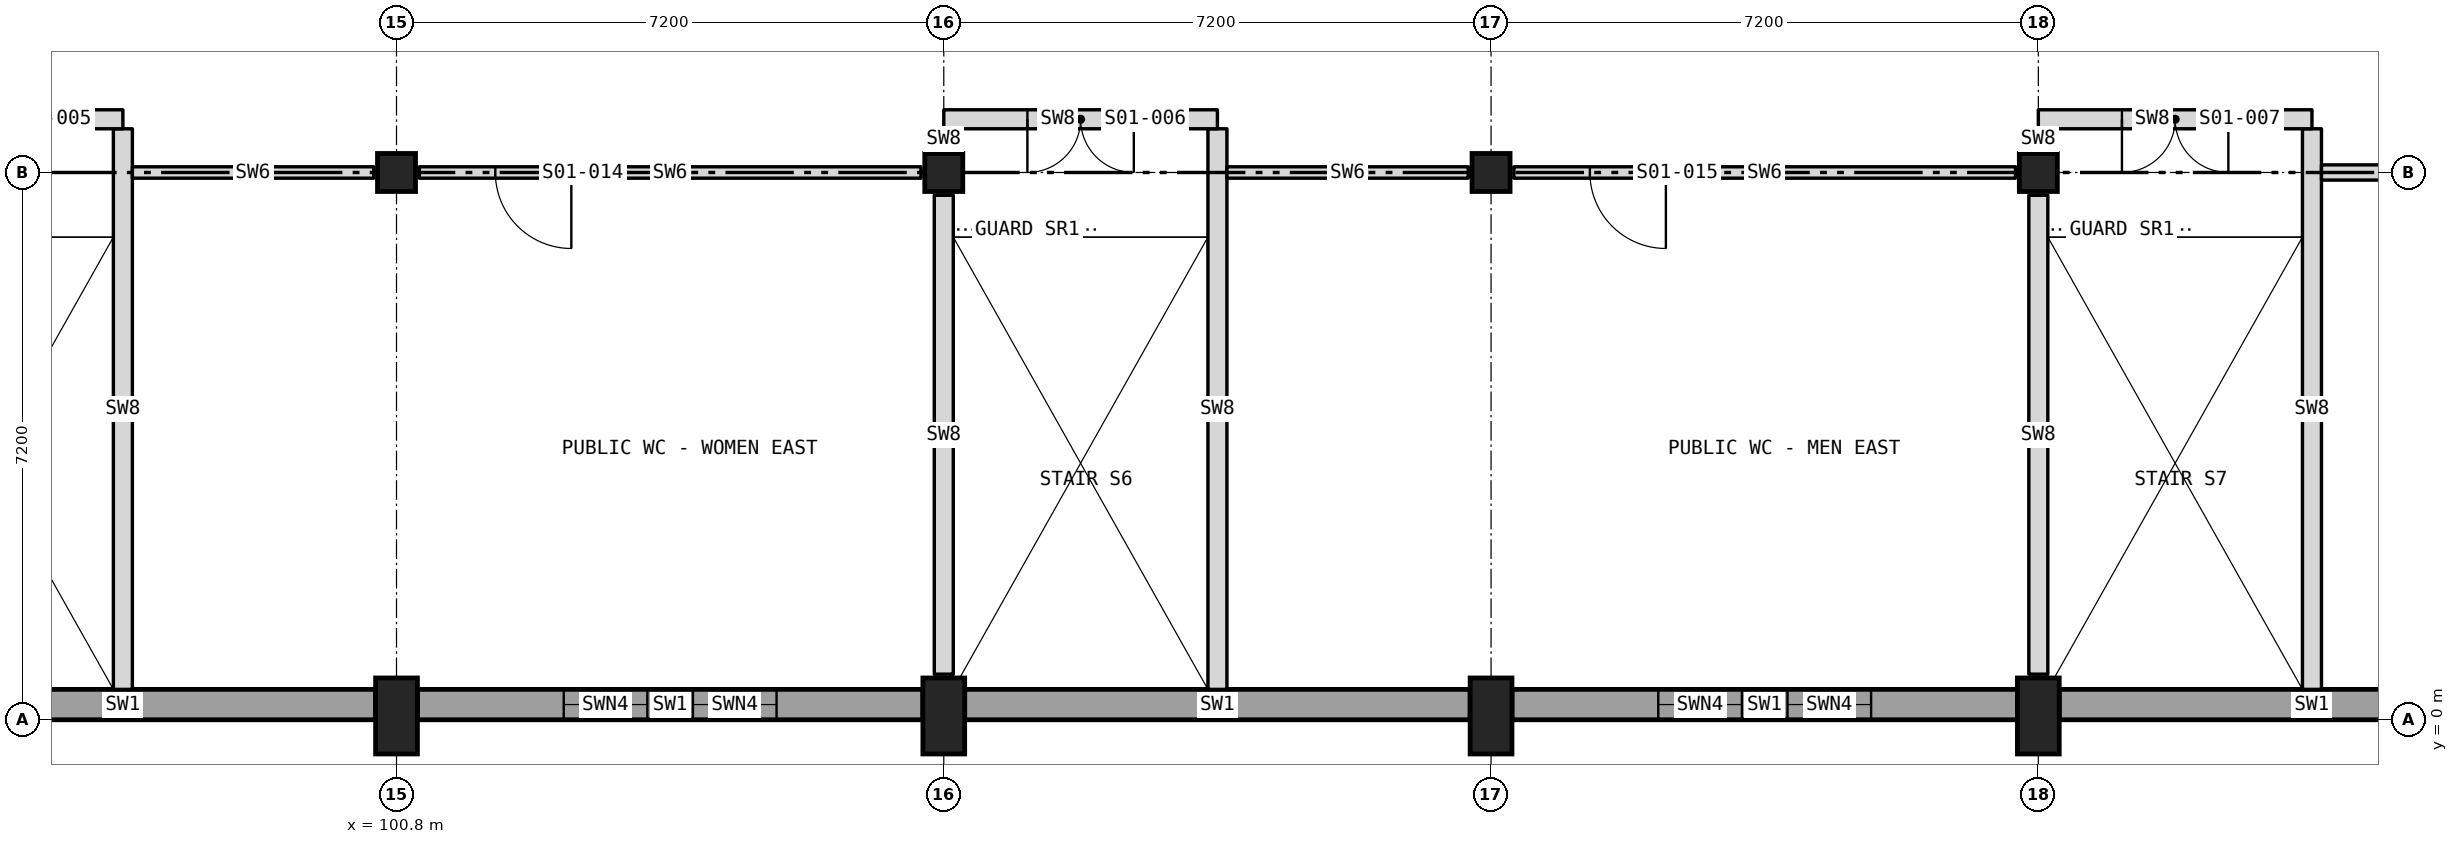
"""IFC4 building model, lengths in metres.
Left out: names, types, materials, properties, quantities, classifications, styles, units other than length and angle.
Written with IfcOpenShell. Run it as: python <this file> out.ifc"""

import sys

from ifc_helpers import new_model, si_unit, direction, frame, frame_2d, origin, origin_2d, place, context, subcontext, project, spatial, rectangle, extrude, element, fill, save


model = new_model("IFC4")
c1 = context("Model", 3, precision=1e-05, world=origin(), true_north=direction((0.0, 1.0)))
c2 = subcontext(c1, "Body", "Model", "MODEL_VIEW")
j1 = project(units=[si_unit("LENGTHUNIT", "METRE"), si_unit("PLANEANGLEUNIT", "RADIAN")], contexts=[c1])
p1 = place(None, origin())
s1 = spatial("IfcSite", under=j1, at=p1, CompositionType="ELEMENT")
p2 = place(p1, origin())
s2 = spatial("IfcBuilding", under=s1, at=p2, CompositionType="ELEMENT")
p3 = place(p2, frame((0.0, 0.0, 6.0)))
s3 = spatial("IfcBuildingStorey", under=s2, at=p3, CompositionType="ELEMENT", Elevation=6.0)
p4 = place(p3, frame((100.8, 0.05, 0.0), z_axis=(0.0, 0.0, 1.0), x_axis=(1.0, 0.0, 0.0)))
e1 = element("IfcColumn", 1, at=p4, inside=s3, PredefinedType="COLUMN", context=c2, shape_type="SweptSolid", body=[
    extrude(rectangle(XDim=0.55, YDim=1.0, at=origin_2d()), origin(), (0.0, 0.0, 1.0), 6.0),
])
p5 = place(p3, frame((100.8, 7.2, 0.0), z_axis=(0.0, 0.0, 1.0), x_axis=(1.0, 0.0, 0.0)))
e2 = element("IfcColumn", 2, at=p5, inside=s3, PredefinedType="COLUMN", context=c2, shape_type="SweptSolid", body=[
    extrude(rectangle(XDim=0.5, YDim=0.5, at=origin_2d()), origin(), (0.0, 0.0, 1.0), 6.0),
])
p6 = place(p3, frame((108.0, 0.05, 0.0), z_axis=(0.0, 0.0, 1.0), x_axis=(1.0, 0.0, 0.0)))
e3 = element("IfcColumn", 3, at=p6, inside=s3, PredefinedType="COLUMN", context=c2, shape_type="SweptSolid", body=[
    extrude(rectangle(XDim=0.55, YDim=1.0, at=origin_2d()), origin(), (0.0, 0.0, 1.0), 6.0),
])
p7 = place(p3, frame((108.0, 7.2, 0.0), z_axis=(0.0, 0.0, 1.0), x_axis=(1.0, 0.0, 0.0)))
e4 = element("IfcColumn", 4, at=p7, inside=s3, PredefinedType="COLUMN", context=c2, shape_type="SweptSolid", body=[
    extrude(rectangle(XDim=0.5, YDim=0.5, at=origin_2d()), origin(), (0.0, 0.0, 1.0), 6.0),
])
p8 = place(p3, frame((115.2, 0.05, 0.0), z_axis=(0.0, 0.0, 1.0), x_axis=(1.0, 0.0, 0.0)))
e5 = element("IfcColumn", 5, at=p8, inside=s3, PredefinedType="COLUMN", context=c2, shape_type="SweptSolid", body=[
    extrude(rectangle(XDim=0.55, YDim=1.0, at=origin_2d()), origin(), (0.0, 0.0, 1.0), 6.0),
])
p9 = place(p3, frame((115.2, 7.2, 0.0), z_axis=(0.0, 0.0, 1.0), x_axis=(1.0, 0.0, 0.0)))
e6 = element("IfcColumn", 6, at=p9, inside=s3, PredefinedType="COLUMN", context=c2, shape_type="SweptSolid", body=[
    extrude(rectangle(XDim=0.5, YDim=0.5, at=origin_2d()), origin(), (0.0, 0.0, 1.0), 6.0),
])
p10 = place(p3, frame((122.4, 0.05, 0.0), z_axis=(0.0, 0.0, 1.0), x_axis=(1.0, 0.0, 0.0)))
e7 = element("IfcColumn", 7, at=p10, inside=s3, PredefinedType="COLUMN", context=c2, shape_type="SweptSolid", body=[
    extrude(rectangle(XDim=0.55, YDim=1.0, at=origin_2d()), origin(), (0.0, 0.0, 1.0), 6.0),
])
p11 = place(p3, frame((122.4, 7.2, 0.0), z_axis=(0.0, 0.0, 1.0), x_axis=(1.0, 0.0, 0.0)))
e8 = element("IfcColumn", 8, at=p11, inside=s3, PredefinedType="COLUMN", context=c2, shape_type="SweptSolid", body=[
    extrude(rectangle(XDim=0.5, YDim=0.5, at=origin_2d()), origin(), (0.0, 0.0, 1.0), 6.0),
])
p12 = place(p3, frame((93.875, 0.2, 0.0), z_axis=(0.0, 0.0, 1.0), x_axis=(1.0, 0.0, 0.0)))
e9 = element("IfcWall", 9, at=p12, inside=s3, PredefinedType="SOLIDWALL", context=c2, shape_type="SweptSolid", body=[
    extrude(rectangle(XDim=6.65, YDim=0.4, at=frame_2d((3.325, 0.0))), origin(), (0.0, 0.0, 1.0), 5.725),
])
p13 = place(p3, frame((101.075, 0.2, 0.0), z_axis=(0.0, 0.0, 1.0), x_axis=(1.0, 0.0, 0.0)))
e10 = element("IfcWall", 10, at=p13, inside=s3, PredefinedType="SOLIDWALL", context=c2, shape_type="SweptSolid", body=[
    extrude(rectangle(XDim=6.65, YDim=0.4, at=frame_2d((3.325, 0.0))), origin(), (0.0, 0.0, 1.0), 5.725),
])
p14 = place(p13, frame((1.925, 0.0, 0.9)))
e11 = element("IfcOpeningElement", 11, at=p14, cuts=e10, PredefinedType="OPENING", context=c2, shape_type="SweptSolid", body=[
    extrude(rectangle(XDim=1.1, YDim=2.4, at=frame_2d((0.55, 1.2))), frame((0.0, 0.21, 0.0), z_axis=(0.0, -1.0, 0.0), x_axis=(1.0, 0.0, 0.0)), (0.0, 0.0, 1.0), 0.42),
])
p15 = place(p13, frame((3.625, 0.0, 0.9)))
e12 = element("IfcOpeningElement", 12, at=p15, cuts=e10, PredefinedType="OPENING", context=c2, shape_type="SweptSolid", body=[
    extrude(rectangle(XDim=1.1, YDim=2.4, at=frame_2d((0.55, 1.2))), frame((0.0, 0.21, 0.0), z_axis=(0.0, -1.0, 0.0), x_axis=(1.0, 0.0, 0.0)), (0.0, 0.0, 1.0), 0.42),
])
p16 = place(p3, frame((108.275, 0.2, 0.0), z_axis=(0.0, 0.0, 1.0), x_axis=(1.0, 0.0, 0.0)))
e13 = element("IfcWall", 13, at=p16, inside=s3, PredefinedType="SOLIDWALL", context=c2, shape_type="SweptSolid", body=[
    extrude(rectangle(XDim=6.65, YDim=0.4, at=frame_2d((3.325, 0.0))), origin(), (0.0, 0.0, 1.0), 5.725),
])
p17 = place(p3, frame((115.475, 0.2, 0.0), z_axis=(0.0, 0.0, 1.0), x_axis=(1.0, 0.0, 0.0)))
e14 = element("IfcWall", 14, at=p17, inside=s3, PredefinedType="SOLIDWALL", context=c2, shape_type="SweptSolid", body=[
    extrude(rectangle(XDim=6.65, YDim=0.4, at=frame_2d((3.325, 0.0))), origin(), (0.0, 0.0, 1.0), 5.725),
])
p18 = place(p17, frame((1.925, 0.0, 0.9)))
e15 = element("IfcOpeningElement", 15, at=p18, cuts=e14, PredefinedType="OPENING", context=c2, shape_type="SweptSolid", body=[
    extrude(rectangle(XDim=1.1, YDim=2.4, at=frame_2d((0.55, 1.2))), frame((0.0, 0.21, 0.0), z_axis=(0.0, -1.0, 0.0), x_axis=(1.0, 0.0, 0.0)), (0.0, 0.0, 1.0), 0.42),
])
p19 = place(p17, frame((3.625, 0.0, 0.9)))
e16 = element("IfcOpeningElement", 16, at=p19, cuts=e14, PredefinedType="OPENING", context=c2, shape_type="SweptSolid", body=[
    extrude(rectangle(XDim=1.1, YDim=2.4, at=frame_2d((0.55, 1.2))), frame((0.0, 0.21, 0.0), z_axis=(0.0, -1.0, 0.0), x_axis=(1.0, 0.0, 0.0)), (0.0, 0.0, 1.0), 0.42),
])
p20 = place(p3, frame((122.675, 0.2, 0.0), z_axis=(0.0, 0.0, 1.0), x_axis=(1.0, 0.0, 0.0)))
e17 = element("IfcWall", 17, at=p20, inside=s3, PredefinedType="SOLIDWALL", context=c2, shape_type="SweptSolid", body=[
    extrude(rectangle(XDim=6.65, YDim=0.4, at=frame_2d((3.325, 0.0))), origin(), (0.0, 0.0, 1.0), 5.725),
])
p21 = place(p3, frame((97.2, 0.4, 0.0), z_axis=(0.0, 0.0, 1.0), x_axis=(0.0, 1.0, 0.0)))
e18 = element("IfcWall", 18, at=p21, inside=s3, PredefinedType="SOLIDWALL", context=c2, shape_type="SweptSolid", body=[
    extrude(rectangle(XDim=7.375, YDim=0.25, at=frame_2d((3.688, 0.0))), origin(), (0.0, 0.0, 1.0), 5.725),
])
p22 = place(p3, frame((108.0, 0.6, 0.0), z_axis=(0.0, 0.0, 1.0), x_axis=(0.0, 1.0, 0.0)))
e19 = element("IfcWall", 19, at=p22, inside=s3, PredefinedType="SOLIDWALL", context=c2, shape_type="SweptSolid", body=[
    extrude(rectangle(XDim=6.3, YDim=0.25, at=frame_2d((3.15, 0.0))), origin(), (0.0, 0.0, 1.0), 5.725),
])
p23 = place(p3, frame((108.0, 7.5, 0.0), z_axis=(0.0, 0.0, 1.0), x_axis=(0.0, 1.0, 0.0)))
e20 = element("IfcWall", 20, at=p23, inside=s3, PredefinedType="SOLIDWALL", context=c2, shape_type="SweptSolid", body=[
    extrude(rectangle(XDim=0.275, YDim=0.25, at=frame_2d((0.137, 0.0))), origin(), (0.0, 0.0, 1.0), 5.725),
])
p24 = place(p3, frame((111.6, 0.4, 0.0), z_axis=(0.0, 0.0, 1.0), x_axis=(0.0, 1.0, 0.0)))
e21 = element("IfcWall", 21, at=p24, inside=s3, PredefinedType="SOLIDWALL", context=c2, shape_type="SweptSolid", body=[
    extrude(rectangle(XDim=7.375, YDim=0.25, at=frame_2d((3.688, 0.0))), origin(), (0.0, 0.0, 1.0), 5.725),
])
p25 = place(p3, frame((122.4, 0.6, 0.0), z_axis=(0.0, 0.0, 1.0), x_axis=(0.0, 1.0, 0.0)))
e22 = element("IfcWall", 22, at=p25, inside=s3, PredefinedType="SOLIDWALL", context=c2, shape_type="SweptSolid", body=[
    extrude(rectangle(XDim=6.3, YDim=0.25, at=frame_2d((3.15, 0.0))), origin(), (0.0, 0.0, 1.0), 5.725),
])
p26 = place(p3, frame((122.4, 7.5, 0.0), z_axis=(0.0, 0.0, 1.0), x_axis=(0.0, 1.0, 0.0)))
e23 = element("IfcWall", 23, at=p26, inside=s3, PredefinedType="SOLIDWALL", context=c2, shape_type="SweptSolid", body=[
    extrude(rectangle(XDim=0.275, YDim=0.25, at=frame_2d((0.137, 0.0))), origin(), (0.0, 0.0, 1.0), 5.725),
])
p27 = place(p3, frame((126.0, 0.4, 0.0), z_axis=(0.0, 0.0, 1.0), x_axis=(0.0, 1.0, 0.0)))
e24 = element("IfcWall", 24, at=p27, inside=s3, PredefinedType="SOLIDWALL", context=c2, shape_type="SweptSolid", body=[
    extrude(rectangle(XDim=7.375, YDim=0.25, at=frame_2d((3.688, 0.0))), origin(), (0.0, 0.0, 1.0), 5.725),
])
p28 = place(p3, frame((97.325, 7.2, 0.0), z_axis=(0.0, 0.0, 1.0), x_axis=(1.0, 0.0, 0.0)))
e25 = element("IfcWall", 25, at=p28, inside=s3, PredefinedType="PARTITIONING", context=c2, shape_type="SweptSolid", body=[
    extrude(rectangle(XDim=3.175, YDim=0.15, at=frame_2d((1.587, 0.0))), origin(), (0.0, 0.0, 1.0), 5.725),
])
p29 = place(p3, frame((101.1, 7.2, 0.0), z_axis=(0.0, 0.0, 1.0), x_axis=(1.0, 0.0, 0.0)))
e26 = element("IfcWall", 26, at=p29, inside=s3, PredefinedType="PARTITIONING", context=c2, shape_type="SweptSolid", body=[
    extrude(rectangle(XDim=6.6, YDim=0.15, at=frame_2d((3.3, 0.0))), origin(), (0.0, 0.0, 1.0), 5.725),
])
p30 = place(p29, frame((1.0, 0.0, 0.0)))
e27 = element("IfcOpeningElement", 27, at=p30, cuts=e26, PredefinedType="OPENING", context=c2, shape_type="SweptSolid", body=[
    extrude(rectangle(XDim=1.0, YDim=2.1, at=frame_2d((0.5, 1.05))), frame((0.0, 0.085, 0.0), z_axis=(0.0, -1.0, 0.0), x_axis=(1.0, 0.0, 0.0)), (0.0, 0.0, 1.0), 0.17),
])
p31 = place(p3, frame((111.725, 7.2, 0.0), z_axis=(0.0, 0.0, 1.0), x_axis=(1.0, 0.0, 0.0)))
e28 = element("IfcWall", 28, at=p31, inside=s3, PredefinedType="PARTITIONING", context=c2, shape_type="SweptSolid", body=[
    extrude(rectangle(XDim=3.175, YDim=0.15, at=frame_2d((1.587, 0.0))), origin(), (0.0, 0.0, 1.0), 5.725),
])
p32 = place(p3, frame((115.5, 7.2, 0.0), z_axis=(0.0, 0.0, 1.0), x_axis=(1.0, 0.0, 0.0)))
e29 = element("IfcWall", 29, at=p32, inside=s3, PredefinedType="PARTITIONING", context=c2, shape_type="SweptSolid", body=[
    extrude(rectangle(XDim=6.6, YDim=0.15, at=frame_2d((3.3, 0.0))), origin(), (0.0, 0.0, 1.0), 5.725),
])
p33 = place(p32, frame((1.0, 0.0, 0.0)))
e30 = element("IfcOpeningElement", 30, at=p33, cuts=e29, PredefinedType="OPENING", context=c2, shape_type="SweptSolid", body=[
    extrude(rectangle(XDim=1.0, YDim=2.1, at=frame_2d((0.5, 1.05))), frame((0.0, 0.085, 0.0), z_axis=(0.0, -1.0, 0.0), x_axis=(1.0, 0.0, 0.0)), (0.0, 0.0, 1.0), 0.17),
])
p34 = place(p3, frame((126.125, 7.2, 0.0), z_axis=(0.0, 0.0, 1.0), x_axis=(1.0, 0.0, 0.0)))
e31 = element("IfcWall", 31, at=p34, inside=s3, PredefinedType="PARTITIONING", context=c2, shape_type="SweptSolid", body=[
    extrude(rectangle(XDim=3.175, YDim=0.2, at=frame_2d((1.587, 0.0))), origin(), (0.0, 0.0, 1.0), 5.725),
])
p35 = place(p3, frame((93.6, 7.9, 0.0), z_axis=(0.0, 0.0, 1.0), x_axis=(1.0, 0.0, 0.0)))
e32 = element("IfcWall", 32, at=p35, inside=s3, PredefinedType="SOLIDWALL", context=c2, shape_type="SweptSolid", body=[
    extrude(rectangle(XDim=3.6, YDim=0.25, at=frame_2d((1.8, 0.0))), origin(), (0.0, 0.0, 1.0), 5.725),
])
p36 = place(p35, frame((1.1, 0.0, 0.0)))
e33 = element("IfcOpeningElement", 33, at=p36, cuts=e32, PredefinedType="OPENING", context=c2, shape_type="SweptSolid", body=[
    extrude(rectangle(XDim=1.4, YDim=2.1, at=frame_2d((0.7, 1.05))), frame((0.0, 0.135, 0.0), z_axis=(0.0, -1.0, 0.0), x_axis=(1.0, 0.0, 0.0)), (0.0, 0.0, 1.0), 0.27),
])
p37 = place(p3, frame((108.0, 7.9, 0.0), z_axis=(0.0, 0.0, 1.0), x_axis=(1.0, 0.0, 0.0)))
e34 = element("IfcWall", 34, at=p37, inside=s3, PredefinedType="SOLIDWALL", context=c2, shape_type="SweptSolid", body=[
    extrude(rectangle(XDim=3.6, YDim=0.25, at=frame_2d((1.8, 0.0))), origin(), (0.0, 0.0, 1.0), 5.725),
])
p38 = place(p37, frame((1.1, 0.0, 0.0)))
e35 = element("IfcOpeningElement", 35, at=p38, cuts=e34, PredefinedType="OPENING", context=c2, shape_type="SweptSolid", body=[
    extrude(rectangle(XDim=1.4, YDim=2.1, at=frame_2d((0.7, 1.05))), frame((0.0, 0.135, 0.0), z_axis=(0.0, -1.0, 0.0), x_axis=(1.0, 0.0, 0.0)), (0.0, 0.0, 1.0), 0.27),
])
p39 = place(p3, frame((122.4, 7.9, 0.0), z_axis=(0.0, 0.0, 1.0), x_axis=(1.0, 0.0, 0.0)))
e36 = element("IfcWall", 36, at=p39, inside=s3, PredefinedType="SOLIDWALL", context=c2, shape_type="SweptSolid", body=[
    extrude(rectangle(XDim=3.6, YDim=0.25, at=frame_2d((1.8, 0.0))), origin(), (0.0, 0.0, 1.0), 5.725),
])
p40 = place(p39, frame((1.1, 0.0, 0.0)))
e37 = element("IfcOpeningElement", 37, at=p40, cuts=e36, PredefinedType="OPENING", context=c2, shape_type="SweptSolid", body=[
    extrude(rectangle(XDim=1.4, YDim=2.1, at=frame_2d((0.7, 1.05))), frame((0.0, 0.135, 0.0), z_axis=(0.0, -1.0, 0.0), x_axis=(1.0, 0.0, 0.0)), (0.0, 0.0, 1.0), 0.27),
])
p41 = place(p14, origin())
e38 = element("IfcWindow", 38, at=p41, inside=s3, PartitioningType="DOUBLE_PANEL_VERTICAL", PredefinedType="WINDOW", context=c2, shape_type="SweptSolid", body=[
    extrude(rectangle(XDim=1.1, YDim=2.4, at=frame_2d((0.55, 1.2))), frame((0.0, 0.16, 0.0), z_axis=(0.0, -1.0, 0.0), x_axis=(1.0, 0.0, 0.0)), (0.0, 0.0, 1.0), 0.06),
])
fill(e11, e38)
p42 = place(p15, origin())
e39 = element("IfcWindow", 39, at=p42, inside=s3, PartitioningType="DOUBLE_PANEL_VERTICAL", PredefinedType="WINDOW", context=c2, shape_type="SweptSolid", body=[
    extrude(rectangle(XDim=1.1, YDim=2.4, at=frame_2d((0.55, 1.2))), frame((0.0, 0.16, 0.0), z_axis=(0.0, -1.0, 0.0), x_axis=(1.0, 0.0, 0.0)), (0.0, 0.0, 1.0), 0.06),
])
fill(e12, e39)
p43 = place(p18, origin())
e40 = element("IfcWindow", 40, at=p43, inside=s3, PartitioningType="DOUBLE_PANEL_VERTICAL", PredefinedType="WINDOW", context=c2, shape_type="SweptSolid", body=[
    extrude(rectangle(XDim=1.1, YDim=2.4, at=frame_2d((0.55, 1.2))), frame((0.0, 0.16, 0.0), z_axis=(0.0, -1.0, 0.0), x_axis=(1.0, 0.0, 0.0)), (0.0, 0.0, 1.0), 0.06),
])
fill(e15, e40)
p44 = place(p19, origin())
e41 = element("IfcWindow", 41, at=p44, inside=s3, PartitioningType="DOUBLE_PANEL_VERTICAL", PredefinedType="WINDOW", context=c2, shape_type="SweptSolid", body=[
    extrude(rectangle(XDim=1.1, YDim=2.4, at=frame_2d((0.55, 1.2))), frame((0.0, 0.16, 0.0), z_axis=(0.0, -1.0, 0.0), x_axis=(1.0, 0.0, 0.0)), (0.0, 0.0, 1.0), 0.06),
])
fill(e16, e41)
p45 = place(p38, frame((1.4, 0.0, 0.0), z_axis=(0.0, 0.0, 1.0), x_axis=(-1.0, 0.0, 0.0)))
e42 = element("IfcDoor", 42, at=p45, inside=s3, OperationType="DOUBLE_DOOR_SINGLE_SWING", PredefinedType="DOOR", context=c2, shape_type="SweptSolid", body=[
    extrude(rectangle(XDim=1.4, YDim=2.1, at=frame_2d((0.7, 1.05))), frame((0.0, 0.025, 0.0), z_axis=(0.0, -1.0, 0.0), x_axis=(1.0, 0.0, 0.0)), (0.0, 0.0, 1.0), 0.05),
])
fill(e35, e42)
p46 = place(p40, frame((1.4, 0.0, 0.0), z_axis=(0.0, 0.0, 1.0), x_axis=(-1.0, 0.0, 0.0)))
e43 = element("IfcDoor", 43, at=p46, inside=s3, OperationType="DOUBLE_DOOR_SINGLE_SWING", PredefinedType="DOOR", context=c2, shape_type="SweptSolid", body=[
    extrude(rectangle(XDim=1.4, YDim=2.1, at=frame_2d((0.7, 1.05))), frame((0.0, 0.025, 0.0), z_axis=(0.0, -1.0, 0.0), x_axis=(1.0, 0.0, 0.0)), (0.0, 0.0, 1.0), 0.05),
])
fill(e37, e43)
p47 = place(p30, frame((1.0, 0.0, 0.0), z_axis=(0.0, 0.0, 1.0), x_axis=(-1.0, 0.0, 0.0)))
e44 = element("IfcDoor", 44, at=p47, inside=s3, OperationType="SINGLE_SWING_LEFT", PredefinedType="DOOR", context=c2, shape_type="SweptSolid", body=[
    extrude(rectangle(XDim=1.0, YDim=2.1, at=frame_2d((0.5, 1.05))), frame((0.0, 0.025, 0.0), z_axis=(0.0, -1.0, 0.0), x_axis=(1.0, 0.0, 0.0)), (0.0, 0.0, 1.0), 0.05),
])
fill(e27, e44)
p48 = place(p33, frame((1.0, 0.0, 0.0), z_axis=(0.0, 0.0, 1.0), x_axis=(-1.0, 0.0, 0.0)))
e45 = element("IfcDoor", 45, at=p48, inside=s3, OperationType="SINGLE_SWING_LEFT", PredefinedType="DOOR", context=c2, shape_type="SweptSolid", body=[
    extrude(rectangle(XDim=1.0, YDim=2.1, at=frame_2d((0.5, 1.05))), frame((0.0, 0.025, 0.0), z_axis=(0.0, -1.0, 0.0), x_axis=(1.0, 0.0, 0.0)), (0.0, 0.0, 1.0), 0.05),
])
fill(e30, e45)
save(model, sys.argv[1])
